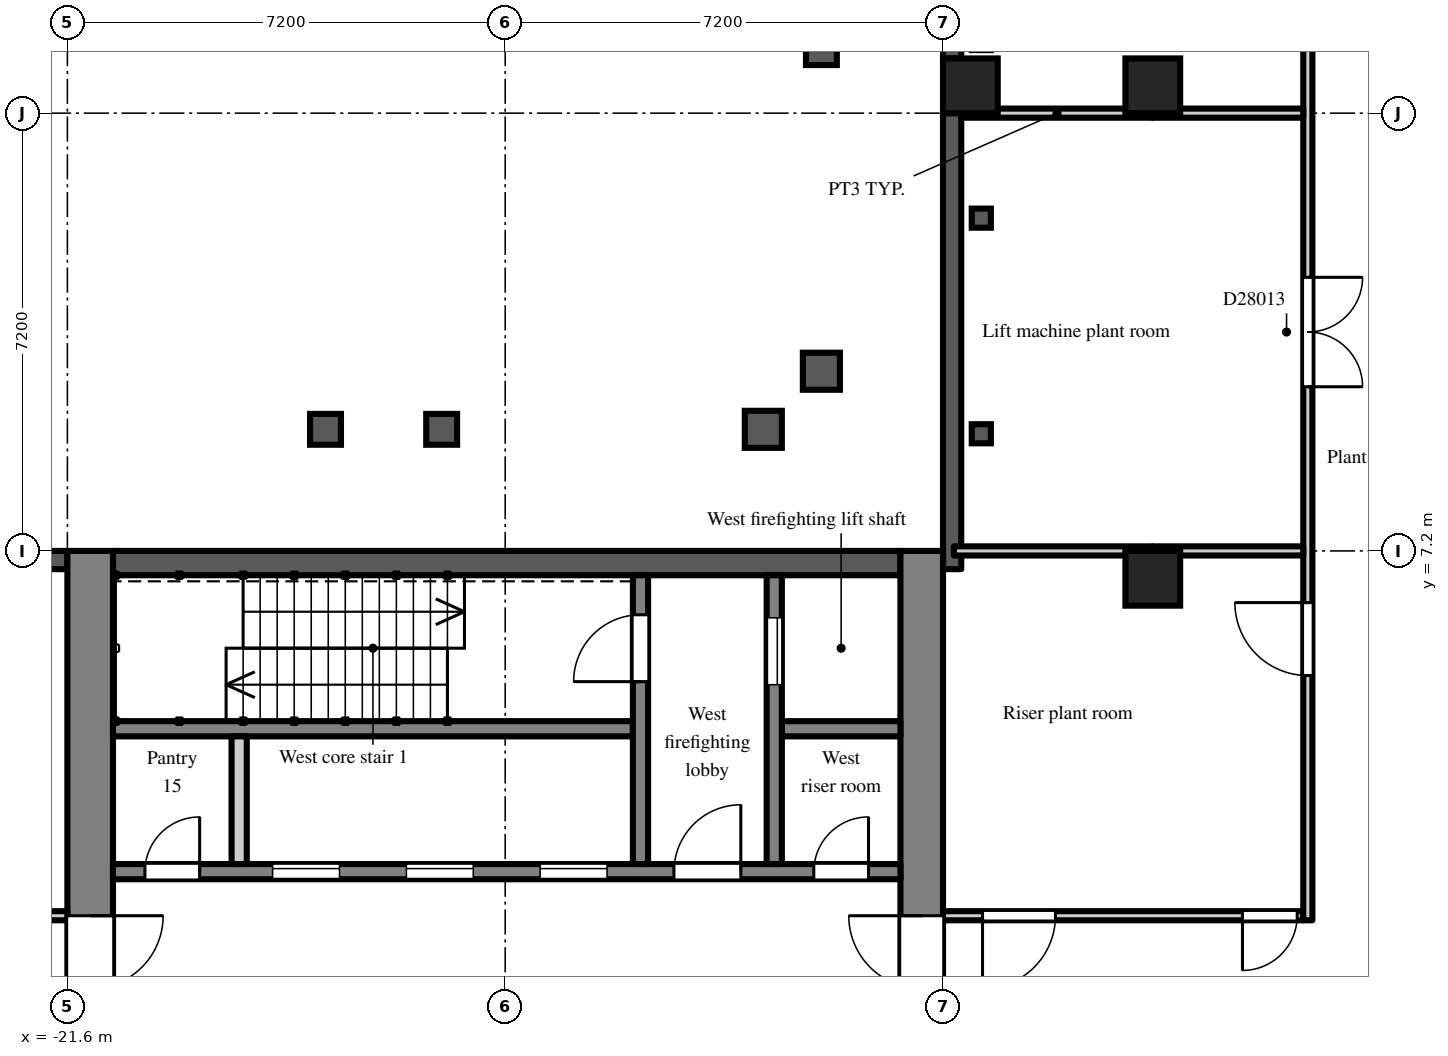
"""IFC4 building model, lengths in metres.
Left out: names, types, materials, properties, quantities, classifications, styles, units other than length and angle.
Written with IfcOpenShell. Run it as: python <this file> out.ifc"""

import sys

from ifc_helpers import new_model, si_unit, direction, frame, frame_2d, origin, origin_2d, place, context, subcontext, project, spatial, polyline, rectangle, outline, extrude, element, fill, save


model = new_model("IFC4")
c1 = context("Model", 3, precision=1e-05, world=origin(), true_north=direction((0.0, 1.0)))
c2 = subcontext(c1, "Body", "Model", "MODEL_VIEW")
j1 = project(units=[si_unit("LENGTHUNIT", "METRE"), si_unit("PLANEANGLEUNIT", "RADIAN")], contexts=[c1])
p1 = place(None, origin())
s1 = spatial("IfcSite", under=j1, at=p1, CompositionType="ELEMENT")
p2 = place(p1, origin())
s2 = spatial("IfcBuilding", under=s1, at=p2, CompositionType="ELEMENT")
p3 = place(p2, frame((0.0, 0.0, 194.7)))
s3 = spatial("IfcBuildingStorey", under=s2, at=p3, CompositionType="ELEMENT", Elevation=194.7)
for number, where, z_axis, x_axis in (
    (1, (-6.75, 14.85, 0.0), (0.0, 0.0, 1.0), (1.0, 0.0, 0.0)),
    (2, (-3.75, 6.75, 0.0), (0.0, 0.0, 1.0), (1.0, 0.0, 0.0)),
    (3, (-3.75, 14.85, 0.0), (0.0, 0.0, 1.0), (1.0, 0.0, 0.0)),
):
    element("IfcColumn", number, at=place(p3, frame(where, z_axis=z_axis, x_axis=x_axis)), inside=s3, PredefinedType="COLUMN", context=c2, shape_type="SweptSolid", body=[
        extrude(rectangle(XDim=0.9, YDim=0.9, at=origin_2d()), origin(), (0.0, 0.0, 1.0), 4.2),
    ])
p4 = place(p3, frame((-7.05, 17.1, 0.0), z_axis=(0.0, 0.0, 1.0), x_axis=(0.0, -1.0, 0.0)))
e4 = element("IfcWall", 4, at=p4, inside=s3, PredefinedType="SOLIDWALL", context=c2, shape_type="SweptSolid", body=[
    extrude(rectangle(XDim=1.8, YDim=0.3, at=frame_2d((0.9, 0.0))), origin(), (0.0, 0.0, 1.0), 3.5),
])
p5 = place(p3, frame((-7.05, 14.4, 0.0), z_axis=(0.0, 0.0, 1.0), x_axis=(0.0, -1.0, 0.0)))
e5 = element("IfcWall", 5, at=p5, inside=s3, PredefinedType="SOLIDWALL", context=c2, shape_type="SweptSolid", body=[
    extrude(rectangle(XDim=7.5, YDim=0.3, at=frame_2d((3.75, 0.0))), origin(), (0.0, 0.0, 1.0), 3.8),
])
p6 = place(p3, frame((-21.6, 7.05, 0.0), z_axis=(0.0, 0.0, 1.0), x_axis=(-1.0, 0.0, 0.0)))
e6 = element("IfcWall", 6, at=p6, inside=s3, PredefinedType="SOLIDWALL", context=c2, shape_type="SweptSolid", body=[
    extrude(rectangle(XDim=2.7, YDim=0.3, at=frame_2d((1.35, 0.0))), origin(), (0.0, 0.0, 1.0), 3.5),
])
p7 = place(p3, frame((-7.55, -7.2, 0.0), z_axis=(0.0, 0.0, 1.0), x_axis=(0.0, 1.0, 0.0)))
e7 = element("IfcWall", 7, at=p7, inside=s3, PredefinedType="SHEAR", context=c2, shape_type="SweptSolid", body=[
    extrude(rectangle(XDim=14.4, YDim=0.7, at=frame_2d((7.2, 0.0))), origin(), (0.0, 0.0, 1.0), 3.8),
])
p8 = place(p7, frame((6.0, 0.0, 0.0)))
e8 = element("IfcOpeningElement", 8, at=p8, cuts=e7, PredefinedType="OPENING", context=c2, shape_type="SweptSolid", body=[
    extrude(rectangle(XDim=2.4, YDim=2.2, at=frame_2d((1.2, 1.1))), frame((0.0, 0.36, 0.0), z_axis=(0.0, -1.0, 0.0), x_axis=(1.0, 0.0, 0.0)), (0.0, 0.0, 1.0), 0.72),
])
p9 = place(p3, frame((-21.225, -7.2, 0.0), z_axis=(0.0, 0.0, 1.0), x_axis=(0.0, 1.0, 0.0)))
e9 = element("IfcWall", 9, at=p9, inside=s3, PredefinedType="SHEAR", context=c2, shape_type="SweptSolid", body=[
    extrude(rectangle(XDim=14.4, YDim=0.75, at=frame_2d((7.2, 0.0))), origin(), (0.0, 0.0, 1.0), 3.8),
])
p10 = place(p9, frame((6.0, 0.0, 0.0)))
e10 = element("IfcOpeningElement", 10, at=p10, cuts=e9, PredefinedType="OPENING", context=c2, shape_type="SweptSolid", body=[
    extrude(rectangle(XDim=2.4, YDim=2.2, at=frame_2d((1.2, 1.1))), frame((0.0, 0.385, 0.0), z_axis=(0.0, -1.0, 0.0), x_axis=(1.0, 0.0, 0.0)), (0.0, 0.0, 1.0), 0.77),
])
p11 = place(p3, frame((-7.9, 7.0, 0.0), z_axis=(0.0, 0.0, 1.0), x_axis=(-1.0, 0.0, 0.0)))
e11 = element("IfcWall", 11, at=p11, inside=s3, PredefinedType="SHEAR", context=c2, shape_type="SweptSolid", body=[
    extrude(rectangle(XDim=12.95, YDim=0.4, at=frame_2d((6.475, 0.0))), origin(), (0.0, 0.0, 1.0), 3.8),
])
p12 = place(p3, frame((-7.9, 1.925, 0.0), z_axis=(0.0, 0.0, 1.0), x_axis=(-1.0, 0.0, 0.0)))
e12 = element("IfcWall", 12, at=p12, inside=s3, PredefinedType="SHEAR", context=c2, shape_type="SweptSolid", body=[
    extrude(rectangle(XDim=12.95, YDim=0.25, at=frame_2d((6.475, 0.0))), origin(), (0.0, 0.0, 1.0), 3.8),
])
p13 = place(p12, frame((4.825, 0.0, 0.0)))
e13 = element("IfcOpeningElement", 13, at=p13, cuts=e12, PredefinedType="OPENING", context=c2, shape_type="SweptSolid", body=[
    extrude(rectangle(XDim=1.1, YDim=2.1, at=frame_2d((0.55, 1.05))), frame((0.0, 0.135, 0.0), z_axis=(0.0, -1.0, 0.0), x_axis=(1.0, 0.0, 0.0)), (0.0, 0.0, 1.0), 0.27),
])
p14 = place(p12, frame((7.025, 0.0, 0.0)))
e14 = element("IfcOpeningElement", 14, at=p14, cuts=e12, PredefinedType="OPENING", context=c2, shape_type="SweptSolid", body=[
    extrude(rectangle(XDim=1.1, YDim=2.1, at=frame_2d((0.55, 1.05))), frame((0.0, 0.135, 0.0), z_axis=(0.0, -1.0, 0.0), x_axis=(1.0, 0.0, 0.0)), (0.0, 0.0, 1.0), 0.27),
])
p15 = place(p12, frame((9.225, 0.0, 0.0)))
e15 = element("IfcOpeningElement", 15, at=p15, cuts=e12, PredefinedType="OPENING", context=c2, shape_type="SweptSolid", body=[
    extrude(rectangle(XDim=1.1, YDim=2.1, at=frame_2d((0.55, 1.05))), frame((0.0, 0.135, 0.0), z_axis=(0.0, -1.0, 0.0), x_axis=(1.0, 0.0, 0.0)), (0.0, 0.0, 1.0), 0.27),
])
p16 = place(p12, frame((0.525, 0.0, 0.0)))
e16 = element("IfcOpeningElement", 16, at=p16, cuts=e12, PredefinedType="OPENING", context=c2, shape_type="SweptSolid", body=[
    extrude(rectangle(XDim=0.9, YDim=2.1, at=frame_2d((0.45, 1.05))), frame((0.0, 0.135, 0.0), z_axis=(0.0, -1.0, 0.0), x_axis=(1.0, 0.0, 0.0)), (0.0, 0.0, 1.0), 0.27),
])
p17 = place(p12, frame((2.625, 0.0, 0.0)))
e17 = element("IfcOpeningElement", 17, at=p17, cuts=e12, PredefinedType="OPENING", context=c2, shape_type="SweptSolid", body=[
    extrude(rectangle(XDim=1.1, YDim=2.1, at=frame_2d((0.55, 1.05))), frame((0.0, 0.135, 0.0), z_axis=(0.0, -1.0, 0.0), x_axis=(1.0, 0.0, 0.0)), (0.0, 0.0, 1.0), 0.27),
])
p18 = place(p12, frame((11.525, 0.0, 0.0)))
e18 = element("IfcOpeningElement", 18, at=p18, cuts=e12, PredefinedType="OPENING", context=c2, shape_type="SweptSolid", body=[
    extrude(rectangle(XDim=0.9, YDim=2.1, at=frame_2d((0.45, 1.05))), frame((0.0, 0.135, 0.0), z_axis=(0.0, -1.0, 0.0), x_axis=(1.0, 0.0, 0.0)), (0.0, 0.0, 1.0), 0.27),
])
p19 = place(p3, frame((-7.9, 4.275, 0.0), z_axis=(0.0, 0.0, 1.0), x_axis=(-1.0, 0.0, 0.0)))
e19 = element("IfcWall", 19, at=p19, inside=s3, PredefinedType="SHEAR", context=c2, shape_type="SweptSolid", body=[
    extrude(rectangle(XDim=1.95, YDim=0.25, at=frame_2d((0.975, 0.0))), origin(), (0.0, 0.0, 1.0), 3.8),
])
p20 = place(p3, frame((-12.3, 4.275, 0.0), z_axis=(0.0, 0.0, 1.0), x_axis=(-1.0, 0.0, 0.0)))
e20 = element("IfcWall", 20, at=p20, inside=s3, PredefinedType="SHEAR", context=c2, shape_type="SweptSolid", body=[
    extrude(rectangle(XDim=8.55, YDim=0.25, at=frame_2d((4.275, 0.0))), origin(), (0.0, 0.0, 1.0), 3.8),
])
p21 = place(p3, frame((-9.975, 2.05, 0.0), z_axis=(0.0, 0.0, 1.0), x_axis=(0.0, 1.0, 0.0)))
e21 = element("IfcWall", 21, at=p21, inside=s3, PredefinedType="SHEAR", context=c2, shape_type="SweptSolid", body=[
    extrude(rectangle(XDim=4.75, YDim=0.25, at=frame_2d((2.375, 0.0))), origin(), (0.0, 0.0, 1.0), 3.8),
])
p22 = place(p21, frame((2.95, 0.0, 0.0)))
e22 = element("IfcOpeningElement", 22, at=p22, cuts=e21, PredefinedType="OPENING", context=c2, shape_type="SweptSolid", body=[
    extrude(rectangle(XDim=1.1, YDim=2.1, at=frame_2d((0.55, 1.05))), frame((0.0, 0.135, 0.0), z_axis=(0.0, -1.0, 0.0), x_axis=(1.0, 0.0, 0.0)), (0.0, 0.0, 1.0), 0.27),
])
p23 = place(p3, frame((-12.175, 2.05, 0.0), z_axis=(0.0, 0.0, 1.0), x_axis=(0.0, 1.0, 0.0)))
e23 = element("IfcWall", 23, at=p23, inside=s3, PredefinedType="SHEAR", context=c2, shape_type="SweptSolid", body=[
    extrude(rectangle(XDim=4.75, YDim=0.25, at=frame_2d((2.375, 0.0))), origin(), (0.0, 0.0, 1.0), 3.8),
])
p24 = place(p23, frame((3.0, 0.0, 0.0)))
e24 = element("IfcOpeningElement", 24, at=p24, cuts=e23, PredefinedType="OPENING", context=c2, shape_type="SweptSolid", body=[
    extrude(rectangle(XDim=1.1, YDim=2.1, at=frame_2d((0.55, 1.05))), frame((0.0, 0.135, 0.0), z_axis=(0.0, -1.0, 0.0), x_axis=(1.0, 0.0, 0.0)), (0.0, 0.0, 1.0), 0.27),
])
p25 = place(p3, frame((-18.775, 2.05, 0.0), z_axis=(0.0, 0.0, 1.0), x_axis=(0.0, 1.0, 0.0)))
e25 = element("IfcWall", 25, at=p25, inside=s3, PredefinedType="PARTITIONING", context=c2, shape_type="SweptSolid", body=[
    extrude(rectangle(XDim=2.1, YDim=0.25, at=frame_2d((1.05, 0.0))), origin(), (0.0, 0.0, 1.0), 3.8),
])
p26 = place(p3, frame((-36.5, 1.2, 0.0), z_axis=(0.0, 0.0, 1.0), x_axis=(1.0, 0.0, 0.0)))
e26 = element("IfcWall", 26, at=p26, inside=s3, PredefinedType="PARTITIONING", context=c2, shape_type="SweptSolid", body=[
    extrude(outline(polyline([(0.0, 0.0), (14.9, 0.0), (14.9, 3.8), (6.102, 3.8), (6.1, 3.4), (5.3, 3.4), (5.298, 3.8), (0.0, 3.8), (0.0, 0.0)])), frame((0.0, 0.075, 0.0), z_axis=(0.0, -1.0, 0.0), x_axis=(1.0, 0.0, 0.0)), (0.0, 0.0, 1.0), 0.15),
])
p27 = place(p26, frame((8.6, 0.0, 0.0)))
e27 = element("IfcOpeningElement", 27, at=p27, cuts=e26, PredefinedType="OPENING", context=c2, shape_type="SweptSolid", body=[
    extrude(rectangle(XDim=1.8, YDim=2.1, at=frame_2d((0.9, 1.05))), frame((0.0, 0.085, 0.0), z_axis=(0.0, -1.0, 0.0), x_axis=(1.0, 0.0, 0.0)), (0.0, 0.0, 1.0), 0.17),
])
p28 = place(p26, frame((12.85, 0.0, 0.0)))
e28 = element("IfcOpeningElement", 28, at=p28, cuts=e26, PredefinedType="OPENING", context=c2, shape_type="SweptSolid", body=[
    extrude(rectangle(XDim=1.2, YDim=2.1, at=frame_2d((0.6, 1.05))), frame((0.0, 0.085, 0.0), z_axis=(0.0, -1.0, 0.0), x_axis=(1.0, 0.0, 0.0)), (0.0, 0.0, 1.0), 0.17),
])
p29 = place(p26, frame((3.25, 0.0, 0.0)))
e29 = element("IfcOpeningElement", 29, at=p29, cuts=e26, PredefinedType="OPENING", context=c2, shape_type="SweptSolid", body=[
    extrude(rectangle(XDim=1.2, YDim=2.1, at=frame_2d((0.6, 1.05))), frame((0.0, 0.085, 0.0), z_axis=(0.0, -1.0, 0.0), x_axis=(1.0, 0.0, 0.0)), (0.0, 0.0, 1.0), 0.17),
])
p30 = place(p3, frame((-7.2, 1.2, 0.0), z_axis=(0.0, 0.0, 1.0), x_axis=(1.0, 0.0, 0.0)))
e30 = element("IfcWall", 30, at=p30, inside=s3, PredefinedType="PARTITIONING", context=c2, shape_type="SweptSolid", body=[
    extrude(rectangle(XDim=5.925, YDim=0.15, at=frame_2d((2.962, 0.0))), origin(), (0.0, 0.0, 1.0), 3.8),
])
p31 = place(p30, frame((0.65, 0.0, 0.0)))
e31 = element("IfcOpeningElement", 31, at=p31, cuts=e30, PredefinedType="OPENING", context=c2, shape_type="SweptSolid", body=[
    extrude(rectangle(XDim=1.2, YDim=2.1, at=frame_2d((0.6, 1.05))), frame((0.0, 0.085, 0.0), z_axis=(0.0, -1.0, 0.0), x_axis=(1.0, 0.0, 0.0)), (0.0, 0.0, 1.0), 0.17),
])
p32 = place(p30, frame((4.925, 0.0, 0.0)))
e32 = element("IfcOpeningElement", 32, at=p32, cuts=e30, PredefinedType="OPENING", context=c2, shape_type="SweptSolid", body=[
    extrude(rectangle(XDim=0.9, YDim=2.1, at=frame_2d((0.45, 1.05))), frame((0.0, 0.085, 0.0), z_axis=(0.0, -1.0, 0.0), x_axis=(1.0, 0.0, 0.0)), (0.0, 0.0, 1.0), 0.17),
])
p33 = place(p3, frame((-7.02, 7.2, 0.0), z_axis=(0.0, 0.0, 1.0), x_axis=(1.0, 0.0, 0.0)))
e33 = element("IfcWall", 33, at=p33, inside=s3, PredefinedType="PARTITIONING", context=c2, shape_type="SweptSolid", body=[
    extrude(rectangle(XDim=3.27, YDim=0.15, at=frame_2d((1.635, 0.0))), origin(), (0.0, 0.0, 1.0), 3.5),
])
p34 = place(p3, frame((-6.9, 14.4, 0.0), z_axis=(0.0, 0.0, 1.0), x_axis=(1.0, 0.0, 0.0)))
e34 = element("IfcWall", 34, at=p34, inside=s3, PredefinedType="PARTITIONING", context=c2, shape_type="SweptSolid", body=[
    extrude(rectangle(XDim=3.15, YDim=0.15, at=frame_2d((1.575, 0.0))), origin(), (0.0, 0.0, 1.0), 3.5),
])
p35 = place(p3, frame((-1.2, 1.125, 0.0), z_axis=(0.0, 0.0, 1.0), x_axis=(0.0, 1.0, 0.0)))
e35 = element("IfcWall", 35, at=p35, inside=s3, PredefinedType="PARTITIONING", context=c2, shape_type="SweptSolid", body=[
    extrude(rectangle(XDim=20.295, YDim=0.15, at=frame_2d((10.147, 0.0))), origin(), (0.0, 0.0, 1.0), 3.8),
])
p36 = place(p35, frame((4.025, 0.0, 0.0)))
e36 = element("IfcOpeningElement", 36, at=p36, cuts=e35, PredefinedType="OPENING", context=c2, shape_type="SweptSolid", body=[
    extrude(rectangle(XDim=1.2, YDim=2.1, at=frame_2d((0.6, 1.05))), frame((0.0, 0.085, 0.0), z_axis=(0.0, -1.0, 0.0), x_axis=(1.0, 0.0, 0.0)), (0.0, 0.0, 1.0), 0.17),
])
p37 = place(p35, frame((8.775, 0.0, 0.0)))
e37 = element("IfcOpeningElement", 37, at=p37, cuts=e35, PredefinedType="OPENING", context=c2, shape_type="SweptSolid", body=[
    extrude(rectangle(XDim=1.8, YDim=2.1, at=frame_2d((0.9, 1.05))), frame((0.0, 0.085, 0.0), z_axis=(0.0, -1.0, 0.0), x_axis=(1.0, 0.0, 0.0)), (0.0, 0.0, 1.0), 0.17),
])
p38 = place(p35, frame((15.825, 0.0, 0.0)))
e38 = element("IfcOpeningElement", 38, at=p38, cuts=e35, PredefinedType="OPENING", context=c2, shape_type="SweptSolid", body=[
    extrude(rectangle(XDim=1.8, YDim=2.1, at=frame_2d((0.9, 1.05))), frame((0.0, 0.085, 0.0), z_axis=(0.0, -1.0, 0.0), x_axis=(1.0, 0.0, 0.0)), (0.0, 0.0, 1.0), 0.17),
])
p39 = place(p35, frame((18.125, 0.0, 0.0)))
e39 = element("IfcOpeningElement", 39, at=p39, cuts=e35, PredefinedType="OPENING", context=c2, shape_type="SweptSolid", body=[
    extrude(rectangle(XDim=1.2, YDim=2.1, at=frame_2d((0.6, 1.05))), frame((0.0, 0.085, 0.0), z_axis=(0.0, -1.0, 0.0), x_axis=(1.0, 0.0, 0.0)), (0.0, 0.0, 1.0), 0.17),
])
for number, where, z_axis, x_axis in (
    (40, (-3.75, 7.2, 0.0), (0.0, 0.0, 1.0), (1.0, 0.0, 0.0)),
    (41, (-3.75, 14.4, 0.0), (0.0, 0.0, 1.0), (1.0, 0.0, 0.0)),
):
    element("IfcWall", number, at=place(p3, frame(where, z_axis=z_axis, x_axis=x_axis)), inside=s3, PredefinedType="PARTITIONING", context=c2, shape_type="SweptSolid", body=[
        extrude(rectangle(XDim=2.475, YDim=0.15, at=frame_2d((1.238, 0.0))), origin(), (0.0, 0.0, 1.0), 3.8),
    ])
p40 = place(p13, origin())
e42 = element("IfcDoor", 42, at=p40, inside=s3, OperationType="SLIDING_TO_LEFT", PredefinedType="DOOR", context=c2, shape_type="SweptSolid", body=[
    extrude(rectangle(XDim=1.1, YDim=2.1, at=frame_2d((0.55, 1.05))), frame((0.0, 0.025, 0.0), z_axis=(0.0, -1.0, 0.0), x_axis=(1.0, 0.0, 0.0)), (0.0, 0.0, 1.0), 0.05),
])
fill(e13, e42)
p41 = place(p14, origin())
e43 = element("IfcDoor", 43, at=p41, inside=s3, OperationType="SLIDING_TO_LEFT", PredefinedType="DOOR", context=c2, shape_type="SweptSolid", body=[
    extrude(rectangle(XDim=1.1, YDim=2.1, at=frame_2d((0.55, 1.05))), frame((0.0, 0.025, 0.0), z_axis=(0.0, -1.0, 0.0), x_axis=(1.0, 0.0, 0.0)), (0.0, 0.0, 1.0), 0.05),
])
fill(e14, e43)
p42 = place(p15, origin())
e44 = element("IfcDoor", 44, at=p42, inside=s3, OperationType="SLIDING_TO_LEFT", PredefinedType="DOOR", context=c2, shape_type="SweptSolid", body=[
    extrude(rectangle(XDim=1.1, YDim=2.1, at=frame_2d((0.55, 1.05))), frame((0.0, 0.025, 0.0), z_axis=(0.0, -1.0, 0.0), x_axis=(1.0, 0.0, 0.0)), (0.0, 0.0, 1.0), 0.05),
])
fill(e15, e44)
p43 = place(p22, origin())
e45 = element("IfcDoor", 45, at=p43, inside=s3, OperationType="SLIDING_TO_LEFT", PredefinedType="DOOR", context=c2, shape_type="SweptSolid", body=[
    extrude(rectangle(XDim=1.1, YDim=2.1, at=frame_2d((0.55, 1.05))), frame((0.0, 0.025, 0.0), z_axis=(0.0, -1.0, 0.0), x_axis=(1.0, 0.0, 0.0)), (0.0, 0.0, 1.0), 0.05),
])
fill(e22, e45)
p44 = place(p24, origin())
e46 = element("IfcDoor", 46, at=p44, inside=s3, OperationType="SINGLE_SWING_LEFT", PredefinedType="DOOR", context=c2, shape_type="SweptSolid", body=[
    extrude(rectangle(XDim=1.1, YDim=2.1, at=frame_2d((0.55, 1.05))), frame((0.0, 0.025, 0.0), z_axis=(0.0, -1.0, 0.0), x_axis=(1.0, 0.0, 0.0)), (0.0, 0.0, 1.0), 0.05),
])
fill(e24, e46)
p45 = place(p16, frame((0.9, 0.0, 0.0), z_axis=(0.0, 0.0, 1.0), x_axis=(-1.0, 0.0, 0.0)))
e47 = element("IfcDoor", 47, at=p45, inside=s3, OperationType="SINGLE_SWING_RIGHT", PredefinedType="DOOR", context=c2, shape_type="SweptSolid", body=[
    extrude(rectangle(XDim=0.9, YDim=2.1, at=frame_2d((0.45, 1.05))), frame((0.0, 0.025, 0.0), z_axis=(0.0, -1.0, 0.0), x_axis=(1.0, 0.0, 0.0)), (0.0, 0.0, 1.0), 0.05),
])
fill(e16, e47)
p46 = place(p17, frame((1.1, 0.0, 0.0), z_axis=(0.0, 0.0, 1.0), x_axis=(-1.0, 0.0, 0.0)))
e48 = element("IfcDoor", 48, at=p46, inside=s3, OperationType="SINGLE_SWING_RIGHT", PredefinedType="DOOR", context=c2, shape_type="SweptSolid", body=[
    extrude(rectangle(XDim=1.1, YDim=2.1, at=frame_2d((0.55, 1.05))), frame((0.0, 0.025, 0.0), z_axis=(0.0, -1.0, 0.0), x_axis=(1.0, 0.0, 0.0)), (0.0, 0.0, 1.0), 0.05),
])
fill(e17, e48)
p47 = place(p8, origin())
e49 = element("IfcDoor", 49, at=p47, inside=s3, OperationType="DOUBLE_DOOR_DOUBLE_SWING", PredefinedType="DOOR", context=c2, shape_type="SweptSolid", body=[
    extrude(rectangle(XDim=2.4, YDim=2.2, at=frame_2d((1.2, 1.1))), frame((0.0, 0.025, 0.0), z_axis=(0.0, -1.0, 0.0), x_axis=(1.0, 0.0, 0.0)), (0.0, 0.0, 1.0), 0.05),
])
fill(e8, e49)
p48 = place(p10, frame((2.4, 0.0, 0.0), z_axis=(0.0, 0.0, 1.0), x_axis=(-1.0, 0.0, 0.0)))
e50 = element("IfcDoor", 50, at=p48, inside=s3, OperationType="DOUBLE_DOOR_DOUBLE_SWING", PredefinedType="DOOR", context=c2, shape_type="SweptSolid", body=[
    extrude(rectangle(XDim=2.4, YDim=2.2, at=frame_2d((1.2, 1.1))), frame((0.0, 0.025, 0.0), z_axis=(0.0, -1.0, 0.0), x_axis=(1.0, 0.0, 0.0)), (0.0, 0.0, 1.0), 0.05),
])
fill(e10, e50)
p49 = place(p18, frame((0.9, 0.0, 0.0), z_axis=(0.0, 0.0, 1.0), x_axis=(-1.0, 0.0, 0.0)))
e51 = element("IfcDoor", 51, at=p49, inside=s3, OperationType="SINGLE_SWING_RIGHT", PredefinedType="DOOR", context=c2, shape_type="SweptSolid", body=[
    extrude(rectangle(XDim=0.9, YDim=2.1, at=frame_2d((0.45, 1.05))), frame((0.0, 0.025, 0.0), z_axis=(0.0, -1.0, 0.0), x_axis=(1.0, 0.0, 0.0)), (0.0, 0.0, 1.0), 0.05),
])
fill(e18, e51)
p50 = place(p31, frame((1.2, 0.0, 0.0), z_axis=(0.0, 0.0, 1.0), x_axis=(-1.0, 0.0, 0.0)))
e52 = element("IfcDoor", 52, at=p50, inside=s3, OperationType="SINGLE_SWING_RIGHT", PredefinedType="DOOR", context=c2, shape_type="SweptSolid", body=[
    extrude(rectangle(XDim=1.2, YDim=2.1, at=frame_2d((0.6, 1.05))), frame((0.0, 0.025, 0.0), z_axis=(0.0, -1.0, 0.0), x_axis=(1.0, 0.0, 0.0)), (0.0, 0.0, 1.0), 0.05),
])
fill(e31, e52)
p51 = place(p32, frame((0.9, 0.0, 0.0), z_axis=(0.0, 0.0, 1.0), x_axis=(-1.0, 0.0, 0.0)))
e53 = element("IfcDoor", 53, at=p51, inside=s3, OperationType="SINGLE_SWING_RIGHT", PredefinedType="DOOR", context=c2, shape_type="SweptSolid", body=[
    extrude(rectangle(XDim=0.9, YDim=2.1, at=frame_2d((0.45, 1.05))), frame((0.0, 0.025, 0.0), z_axis=(0.0, -1.0, 0.0), x_axis=(1.0, 0.0, 0.0)), (0.0, 0.0, 1.0), 0.05),
])
fill(e32, e53)
p52 = place(p36, origin())
e54 = element("IfcDoor", 54, at=p52, inside=s3, OperationType="SINGLE_SWING_RIGHT", PredefinedType="DOOR", context=c2, shape_type="SweptSolid", body=[
    extrude(rectangle(XDim=1.2, YDim=2.1, at=frame_2d((0.6, 1.05))), frame((0.0, 0.025, 0.0), z_axis=(0.0, -1.0, 0.0), x_axis=(1.0, 0.0, 0.0)), (0.0, 0.0, 1.0), 0.05),
])
fill(e36, e54)
p53 = place(p37, frame((1.8, 0.0, 0.0), z_axis=(0.0, 0.0, 1.0), x_axis=(-1.0, 0.0, 0.0)))
e55 = element("IfcDoor", 55, at=p53, inside=s3, OperationType="DOUBLE_DOOR_DOUBLE_SWING", PredefinedType="DOOR", context=c2, shape_type="SweptSolid", body=[
    extrude(rectangle(XDim=1.8, YDim=2.1, at=frame_2d((0.9, 1.05))), frame((0.0, 0.025, 0.0), z_axis=(0.0, -1.0, 0.0), x_axis=(1.0, 0.0, 0.0)), (0.0, 0.0, 1.0), 0.05),
])
fill(e37, e55)
save(model, sys.argv[1])
